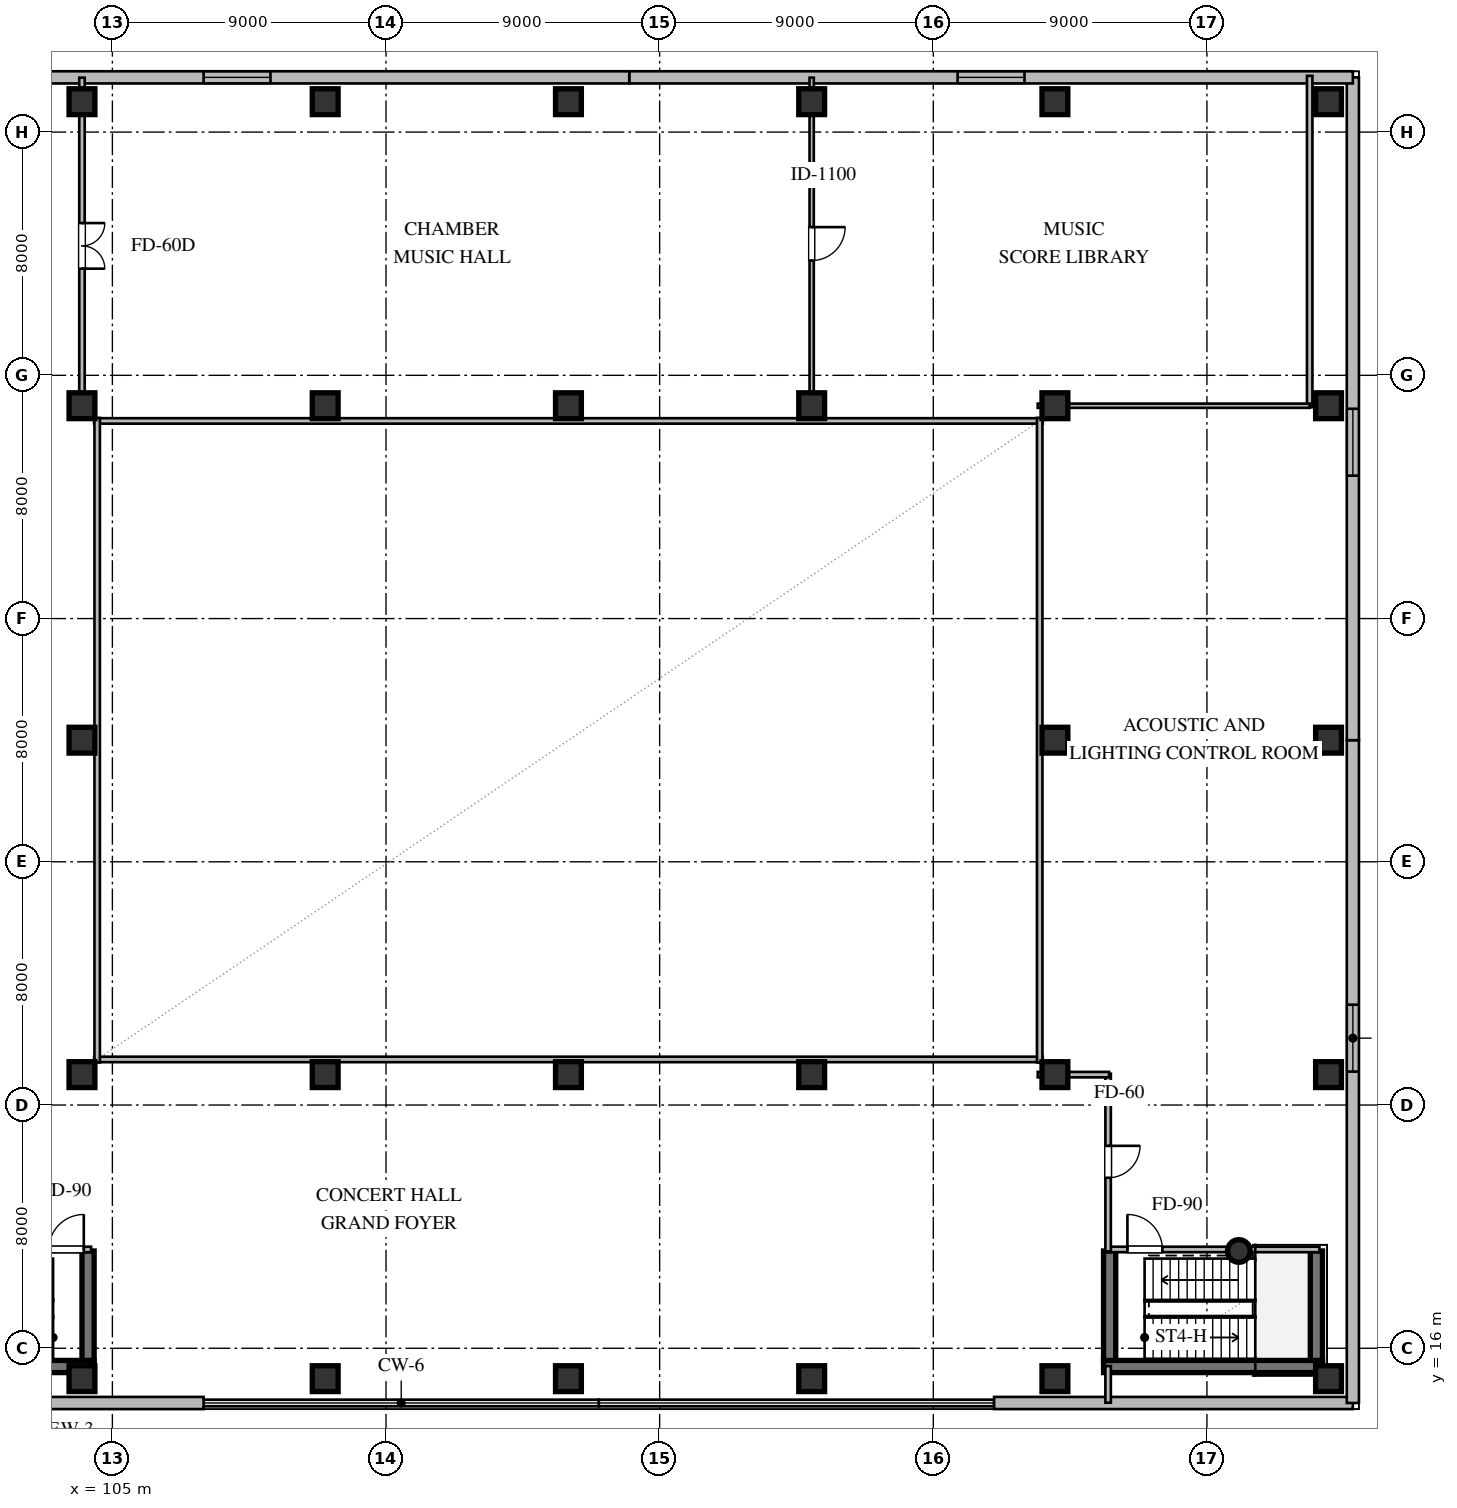
"""IFC4 building model, lengths in metres.
Left out: names, types, materials, properties, quantities, classifications, styles, units other than length and angle.
Written with IfcOpenShell. Run it as: python <this file> out.ifc"""

import sys

from ifc_helpers import new_model, si_unit, direction, frame, frame_2d, origin, origin_2d, place, context, subcontext, project, spatial, rectangle, circle, extrude, element, fill, save


model = new_model("IFC4")
c1 = context("Model", 3, precision=1e-05, world=origin(), true_north=direction((0.0, 1.0)))
c2 = subcontext(c1, "Body", "Model", "MODEL_VIEW")
j1 = project(units=[si_unit("LENGTHUNIT", "METRE"), si_unit("PLANEANGLEUNIT", "RADIAN")], contexts=[c1])
p1 = place(None, origin())
s1 = spatial("IfcSite", under=j1, at=p1, CompositionType="ELEMENT")
p2 = place(p1, origin())
s2 = spatial("IfcBuilding", under=s1, at=p2, CompositionType="ELEMENT")
p3 = place(p2, frame((0.0, 0.0, 9.6)))
s3 = spatial("IfcBuildingStorey", under=s2, at=p3, CompositionType="ELEMENT", Elevation=9.6)
for number, where, z_axis, x_axis in (
    (1, (104.0, 15.0, 0.0), (0.0, 0.0, 1.0), (1.0, 0.0, 0.0)),
    (2, (104.0, 25.0, 0.0), (0.0, 0.0, 1.0), (1.0, 0.0, 0.0)),
    (3, (104.0, 36.0, 0.0), (0.0, 0.0, 1.0), (1.0, 0.0, 0.0)),
    (4, (104.0, 47.0, 0.0), (0.0, 0.0, 1.0), (1.0, 0.0, 0.0)),
    (5, (104.0, 57.0, 0.0), (0.0, 0.0, 1.0), (1.0, 0.0, 0.0)),
    (6, (112.0, 15.0, 0.0), (0.0, 0.0, 1.0), (1.0, 0.0, 0.0)),
    (7, (112.0, 25.0, 0.0), (0.0, 0.0, 1.0), (1.0, 0.0, 0.0)),
    (8, (112.0, 47.0, 0.0), (0.0, 0.0, 1.0), (1.0, 0.0, 0.0)),
    (9, (112.0, 57.0, 0.0), (0.0, 0.0, 1.0), (1.0, 0.0, 0.0)),
    (10, (120.0, 15.0, 0.0), (0.0, 0.0, 1.0), (1.0, 0.0, 0.0)),
    (11, (120.0, 25.0, 0.0), (0.0, 0.0, 1.0), (1.0, 0.0, 0.0)),
    (12, (120.0, 47.0, 0.0), (0.0, 0.0, 1.0), (1.0, 0.0, 0.0)),
    (13, (120.0, 57.0, 0.0), (0.0, 0.0, 1.0), (1.0, 0.0, 0.0)),
    (14, (128.0, 15.0, 0.0), (0.0, 0.0, 1.0), (1.0, 0.0, 0.0)),
    (15, (128.0, 25.0, 0.0), (0.0, 0.0, 1.0), (1.0, 0.0, 0.0)),
    (16, (128.0, 47.0, 0.0), (0.0, 0.0, 1.0), (1.0, 0.0, 0.0)),
    (17, (128.0, 57.0, 0.0), (0.0, 0.0, 1.0), (1.0, 0.0, 0.0)),
    (18, (136.0, 15.0, 0.0), (0.0, 0.0, 1.0), (1.0, 0.0, 0.0)),
    (19, (136.0, 25.0, 0.0), (0.0, 0.0, 1.0), (1.0, 0.0, 0.0)),
    (20, (136.0, 36.0, 0.0), (0.0, 0.0, 1.0), (1.0, 0.0, 0.0)),
    (21, (136.0, 47.0, 0.0), (0.0, 0.0, 1.0), (1.0, 0.0, 0.0)),
    (22, (136.0, 57.0, 0.0), (0.0, 0.0, 1.0), (1.0, 0.0, 0.0)),
    (23, (145.0, 15.0, 0.0), (0.0, 0.0, 1.0), (1.0, 0.0, 0.0)),
    (24, (145.0, 25.0, 0.0), (0.0, 0.0, 1.0), (1.0, 0.0, 0.0)),
    (25, (145.0, 36.0, 0.0), (0.0, 0.0, 1.0), (1.0, 0.0, 0.0)),
    (26, (145.0, 47.0, 0.0), (0.0, 0.0, 1.0), (1.0, 0.0, 0.0)),
    (27, (145.0, 57.0, 0.0), (0.0, 0.0, 1.0), (1.0, 0.0, 0.0)),
):
    element("IfcColumn", number, at=place(p3, frame(where, z_axis=z_axis, x_axis=x_axis)), inside=s3, PredefinedType="COLUMN", context=c2, shape_type="SweptSolid", body=[
        extrude(rectangle(XDim=0.85, YDim=0.85, at=origin_2d()), origin(), (0.0, 0.0, 1.0), 4.8),
    ])
p4 = place(p3, frame((97.2, 15.4, 0.0), z_axis=(0.0, 0.0, 1.0), x_axis=(1.0, 0.0, 0.0)))
e28 = element("IfcWall", 28, at=p4, inside=s3, PredefinedType="SHEAR", context=c2, shape_type="SweptSolid", body=[
    extrude(rectangle(XDim=7.2, YDim=0.4, at=frame_2d((3.6, 0.0))), origin(), (0.0, 0.0, 1.0), 4.52),
])
p5 = place(p3, frame((104.2, 15.6, 0.0), z_axis=(0.0, 0.0, 1.0), x_axis=(0.0, 1.0, 0.0)))
e29 = element("IfcWall", 29, at=p5, inside=s3, PredefinedType="SHEAR", context=c2, shape_type="SweptSolid", body=[
    extrude(rectangle(XDim=3.6, YDim=0.4, at=frame_2d((1.8, 0.0))), origin(), (0.0, 0.0, 1.0), 4.52),
])
p6 = place(p3, frame((137.6, 15.4, 0.0), z_axis=(0.0, 0.0, 1.0), x_axis=(1.0, 0.0, 0.0)))
e30 = element("IfcWall", 30, at=p6, inside=s3, PredefinedType="SHEAR", context=c2, shape_type="SweptSolid", body=[
    extrude(rectangle(XDim=7.2, YDim=0.4, at=frame_2d((3.6, 0.0))), origin(), (0.0, 0.0, 1.0), 4.52),
])
for number, where, z_axis, x_axis in (
    (31, (137.8, 15.6, 0.0), (0.0, 0.0, 1.0), (0.0, 1.0, 0.0)),
    (32, (144.6, 15.6, 0.0), (0.0, 0.0, 1.0), (0.0, 1.0, 0.0)),
):
    element("IfcWall", number, at=place(p3, frame(where, z_axis=z_axis, x_axis=x_axis)), inside=s3, PredefinedType="SHEAR", context=c2, shape_type="SweptSolid", body=[
        extrude(rectangle(XDim=3.6, YDim=0.4, at=frame_2d((1.8, 0.0))), origin(), (0.0, 0.0, 1.0), 4.52),
    ])
p7 = place(p3, frame((142.05, 19.2, 0.0), z_axis=(0.0, 0.0, 1.0), x_axis=(1.0, 0.0, 0.0)))
e33 = element("IfcColumn", 33, at=p7, inside=s3, PredefinedType="COLUMN", context=c2, shape_type="SweptSolid", body=[
    extrude(circle(Radius=0.375, at=origin_2d()), origin(), (0.0, 0.0, 1.0), 4.8),
])
for number, where, z_axis, x_axis in (
    (34, (96.2, 14.2, 0.0), (0.0, 0.0, 1.0), (1.0, 0.0, 0.0)),
    (35, (134.0, 14.2, 0.0), (0.0, 0.0, 1.0), (1.0, 0.0, 0.0)),
):
    element("IfcWall", number, at=place(p3, frame(where, z_axis=z_axis, x_axis=x_axis)), inside=s3, PredefinedType="STANDARD", context=c2, shape_type="SweptSolid", body=[
        extrude(rectangle(XDim=11.8, YDim=0.4, at=frame_2d((5.9, 0.0))), origin(), (0.0, 0.0, 1.0), 4.52),
    ])
p8 = place(p3, frame((145.8, 14.2, 0.0), z_axis=(0.0, 0.0, 1.0), x_axis=(0.0, 1.0, 0.0)))
e36 = element("IfcWall", 36, at=p8, inside=s3, PredefinedType="STANDARD", context=c2, shape_type="SweptSolid", body=[
    extrude(rectangle(XDim=21.8, YDim=0.4, at=frame_2d((10.9, 0.0))), origin(), (0.0, 0.0, 1.0), 4.52),
])
p9 = place(p8, frame((10.9, 0.0, 1.25)))
e37 = element("IfcOpeningElement", 37, at=p9, cuts=e36, PredefinedType="OPENING", context=c2, shape_type="SweptSolid", body=[
    extrude(rectangle(XDim=2.2, YDim=1.5, at=frame_2d((1.1, 0.75))), frame((0.0, 0.21, 0.0), z_axis=(0.0, -1.0, 0.0), x_axis=(1.0, 0.0, 0.0)), (0.0, 0.0, 1.0), 0.42),
])
p10 = place(p3, frame((145.8, 36.0, 0.0), z_axis=(0.0, 0.0, 1.0), x_axis=(0.0, 1.0, 0.0)))
e38 = element("IfcWall", 38, at=p10, inside=s3, PredefinedType="STANDARD", context=c2, shape_type="SweptSolid", body=[
    extrude(rectangle(XDim=21.8, YDim=0.4, at=frame_2d((10.9, 0.0))), origin(), (0.0, 0.0, 1.0), 4.52),
])
p11 = place(p10, frame((8.7, 0.0, 1.25)))
e39 = element("IfcOpeningElement", 39, at=p11, cuts=e38, PredefinedType="OPENING", context=c2, shape_type="SweptSolid", body=[
    extrude(rectangle(XDim=2.2, YDim=1.5, at=frame_2d((1.1, 0.75))), frame((0.0, 0.21, 0.0), z_axis=(0.0, -1.0, 0.0), x_axis=(1.0, 0.0, 0.0)), (0.0, 0.0, 1.0), 0.42),
])
p12 = place(p3, frame((145.8, 57.8, 0.0), z_axis=(0.0, 0.0, 1.0), x_axis=(-1.0, 0.0, 0.0)))
e40 = element("IfcWall", 40, at=p12, inside=s3, PredefinedType="STANDARD", context=c2, shape_type="SweptSolid", body=[
    extrude(rectangle(XDim=23.8, YDim=0.4, at=frame_2d((11.9, 0.0))), origin(), (0.0, 0.0, 1.0), 4.52),
])
p13 = place(p12, frame((10.8, 0.0, 1.25)))
e41 = element("IfcOpeningElement", 41, at=p13, cuts=e40, PredefinedType="OPENING", context=c2, shape_type="SweptSolid", body=[
    extrude(rectangle(XDim=2.2, YDim=1.5, at=frame_2d((1.1, 0.75))), frame((0.0, 0.21, 0.0), z_axis=(0.0, -1.0, 0.0), x_axis=(1.0, 0.0, 0.0)), (0.0, 0.0, 1.0), 0.42),
])
p14 = place(p3, frame((122.0, 57.8, 0.0), z_axis=(0.0, 0.0, 1.0), x_axis=(-1.0, 0.0, 0.0)))
e42 = element("IfcWall", 42, at=p14, inside=s3, PredefinedType="STANDARD", context=c2, shape_type="SweptSolid", body=[
    extrude(rectangle(XDim=25.8, YDim=0.4, at=frame_2d((12.9, 0.0))), origin(), (0.0, 0.0, 1.0), 4.52),
])
p15 = place(p14, frame((11.8, 0.0, 1.25)))
e43 = element("IfcOpeningElement", 43, at=p15, cuts=e42, PredefinedType="OPENING", context=c2, shape_type="SweptSolid", body=[
    extrude(rectangle(XDim=2.2, YDim=1.5, at=frame_2d((1.1, 0.75))), frame((0.0, 0.21, 0.0), z_axis=(0.0, -1.0, 0.0), x_axis=(1.0, 0.0, 0.0)), (0.0, 0.0, 1.0), 0.42),
])
p16 = place(p3, frame((97.3, 19.25, 0.0), z_axis=(0.0, 0.0, 1.0), x_axis=(1.0, 0.0, 0.0)))
e44 = element("IfcWall", 44, at=p16, inside=s3, PredefinedType="PARTITIONING", context=c2, shape_type="SweptSolid", body=[
    extrude(rectangle(XDim=7.0, YDim=0.18, at=frame_2d((3.5, 0.0))), origin(), (0.0, 0.0, 1.0), 4.52),
])
p17 = place(p16, frame((5.61, 0.0, 0.0)))
e45 = element("IfcOpeningElement", 45, at=p17, cuts=e44, PredefinedType="OPENING", context=c2, shape_type="SweptSolid", body=[
    extrude(rectangle(XDim=1.15, YDim=2.1, at=frame_2d((0.575, 1.05))), frame((0.0, 0.1, 0.0), z_axis=(0.0, -1.0, 0.0), x_axis=(1.0, 0.0, 0.0)), (0.0, 0.0, 1.0), 0.2),
])
p18 = place(p3, frame((137.7, 19.25, 0.0), z_axis=(0.0, 0.0, 1.0), x_axis=(1.0, 0.0, 0.0)))
e46 = element("IfcWall", 46, at=p18, inside=s3, PredefinedType="PARTITIONING", context=c2, shape_type="SweptSolid", body=[
    extrude(rectangle(XDim=7.0, YDim=0.18, at=frame_2d((3.5, 0.0))), origin(), (0.0, 0.0, 1.0), 4.52),
])
p19 = place(p18, frame((0.685, 0.0, 0.0)))
e47 = element("IfcOpeningElement", 47, at=p19, cuts=e46, PredefinedType="OPENING", context=c2, shape_type="SweptSolid", body=[
    extrude(rectangle(XDim=1.15, YDim=2.1, at=frame_2d((0.575, 1.05))), frame((0.0, 0.1, 0.0), z_axis=(0.0, -1.0, 0.0), x_axis=(1.0, 0.0, 0.0)), (0.0, 0.0, 1.0), 0.2),
])
for number, where, z_axis, x_axis in (
    (48, (104.4, 25.5, 0.0), (0.0, 0.0, 1.0), (1.0, 0.0, 0.0)),
    (49, (104.4, 46.5, 0.0), (0.0, 0.0, 1.0), (1.0, 0.0, 0.0)),
):
    element("IfcWall", number, at=place(p3, frame(where, z_axis=z_axis, x_axis=x_axis)), inside=s3, PredefinedType="PARTITIONING", context=c2, shape_type="SweptSolid", body=[
        extrude(rectangle(XDim=31.2, YDim=0.18, at=frame_2d((15.6, 0.0))), origin(), (0.0, 0.0, 1.0), 3.899),
    ])
for number, where, z_axis, x_axis in (
    (50, (104.5, 25.4, 0.0), (0.0, 0.0, 1.0), (0.0, 1.0, 0.0)),
    (51, (135.5, 25.4, 0.0), (0.0, 0.0, 1.0), (0.0, 1.0, 0.0)),
):
    element("IfcWall", number, at=place(p3, frame(where, z_axis=z_axis, x_axis=x_axis)), inside=s3, PredefinedType="PARTITIONING", context=c2, shape_type="SweptSolid", body=[
        extrude(rectangle(XDim=21.2, YDim=0.18, at=frame_2d((10.6, 0.0))), origin(), (0.0, 0.0, 1.0), 4.093),
    ])
p20 = place(p3, frame((144.38, 46.95, 0.0), z_axis=(0.0, 0.0, 1.0), x_axis=(0.0, 1.0, 0.0)))
e52 = element("IfcWall", 52, at=p20, inside=s3, PredefinedType="PARTITIONING", context=c2, shape_type="SweptSolid", body=[
    extrude(rectangle(XDim=10.9, YDim=0.18, at=frame_2d((5.45, 0.0))), origin(), (0.0, 0.0, 1.0), 4.093),
])
p21 = place(p3, frame((104.0, 57.79, 0.0), z_axis=(0.0, 0.0, 1.0), x_axis=(0.0, -1.0, 0.0)))
e53 = element("IfcWall", 53, at=p21, inside=s3, PredefinedType="PARTITIONING", context=c2, shape_type="SweptSolid", body=[
    extrude(rectangle(XDim=10.855, YDim=0.18, at=frame_2d((5.427, 0.0))), origin(), (0.0, 0.0, 1.0), 4.093),
])
p22 = place(p21, frame((4.782, 0.0, 0.0)))
e54 = element("IfcOpeningElement", 54, at=p22, cuts=e53, PredefinedType="OPENING", context=c2, shape_type="SweptSolid", body=[
    extrude(rectangle(XDim=1.5, YDim=2.15, at=frame_2d((0.75, 1.075))), frame((0.0, 0.1, 0.0), z_axis=(0.0, -1.0, 0.0), x_axis=(1.0, 0.0, 0.0)), (0.0, 0.0, 1.0), 0.2),
])
p23 = place(p3, frame((137.75, 25.03, 0.0), z_axis=(0.0, 0.0, 1.0), x_axis=(0.0, -1.0, 0.0)))
e55 = element("IfcWall", 55, at=p23, inside=s3, PredefinedType="PARTITIONING", context=c2, shape_type="SweptSolid", body=[
    extrude(rectangle(XDim=5.845, YDim=0.18, at=frame_2d((2.922, 0.0))), origin(), (0.0, 0.0, 1.0), 4.52),
])
p24 = place(p23, frame((2.372, 0.0, 0.0)))
e56 = element("IfcOpeningElement", 56, at=p24, cuts=e55, PredefinedType="OPENING", context=c2, shape_type="SweptSolid", body=[
    extrude(rectangle(XDim=1.05, YDim=2.1, at=frame_2d((0.525, 1.05))), frame((0.0, 0.1, 0.0), z_axis=(0.0, -1.0, 0.0), x_axis=(1.0, 0.0, 0.0)), (0.0, 0.0, 1.0), 0.2),
])
p25 = place(p3, frame((135.435, 25.0, 0.0), z_axis=(0.0, 0.0, 1.0), x_axis=(1.0, 0.0, 0.0)))
e57 = element("IfcWall", 57, at=p25, inside=s3, PredefinedType="PARTITIONING", context=c2, shape_type="SweptSolid", body=[
    extrude(rectangle(XDim=2.345, YDim=0.18, at=frame_2d((1.172, 0.0))), origin(), (0.0, 0.0, 1.0), 3.899),
])
p26 = place(p3, frame((137.75, 15.415, 0.0), z_axis=(0.0, 0.0, 1.0), x_axis=(0.0, -1.0, 0.0)))
e58 = element("IfcWall", 58, at=p26, inside=s3, PredefinedType="PARTITIONING", context=c2, shape_type="SweptSolid", body=[
    extrude(rectangle(XDim=1.205, YDim=0.18, at=frame_2d((0.603, 0.0))), origin(), (0.0, 0.0, 1.0), 4.52),
])
p27 = place(p3, frame((128.0, 57.79, 0.0), z_axis=(0.0, 0.0, 1.0), x_axis=(0.0, -1.0, 0.0)))
e59 = element("IfcWall", 59, at=p27, inside=s3, PredefinedType="PARTITIONING", context=c2, shape_type="SweptSolid", body=[
    extrude(rectangle(XDim=10.82, YDim=0.14, at=frame_2d((5.41, 0.0))), origin(), (0.0, 0.0, 1.0), 4.093),
])
p28 = place(p27, frame((4.915, 0.0, 0.0)))
e60 = element("IfcOpeningElement", 60, at=p28, cuts=e59, PredefinedType="OPENING", context=c2, shape_type="SweptSolid", body=[
    extrude(rectangle(XDim=1.1, YDim=2.1, at=frame_2d((0.55, 1.05))), frame((0.0, 0.08, 0.0), z_axis=(0.0, -1.0, 0.0), x_axis=(1.0, 0.0, 0.0)), (0.0, 0.0, 1.0), 0.16),
])
p29 = place(p3, frame((144.38, 47.0, 0.0), z_axis=(0.0, 0.0, 1.0), x_axis=(-1.0, 0.0, 0.0)))
e61 = element("IfcWall", 61, at=p29, inside=s3, PredefinedType="PARTITIONING", context=c2, shape_type="SweptSolid", body=[
    extrude(rectangle(XDim=8.945, YDim=0.14, at=frame_2d((4.472, 0.0))), origin(), (0.0, 0.0, 1.0), 3.899),
])
p30 = place(p9, origin())
e62 = element("IfcWindow", 62, at=p30, inside=s3, PartitioningType="SINGLE_PANEL", PredefinedType="WINDOW", context=c2, shape_type="SweptSolid", body=[
    extrude(rectangle(XDim=2.2, YDim=1.5, at=frame_2d((1.1, 0.75))), frame((0.0, 0.03, 0.0), z_axis=(0.0, -1.0, 0.0), x_axis=(1.0, 0.0, 0.0)), (0.0, 0.0, 1.0), 0.06),
])
fill(e37, e62)
p31 = place(p11, origin())
e63 = element("IfcWindow", 63, at=p31, inside=s3, PartitioningType="SINGLE_PANEL", PredefinedType="WINDOW", context=c2, shape_type="SweptSolid", body=[
    extrude(rectangle(XDim=2.2, YDim=1.5, at=frame_2d((1.1, 0.75))), frame((0.0, 0.03, 0.0), z_axis=(0.0, -1.0, 0.0), x_axis=(1.0, 0.0, 0.0)), (0.0, 0.0, 1.0), 0.06),
])
fill(e39, e63)
p32 = place(p13, origin())
e64 = element("IfcWindow", 64, at=p32, inside=s3, PartitioningType="SINGLE_PANEL", PredefinedType="WINDOW", context=c2, shape_type="SweptSolid", body=[
    extrude(rectangle(XDim=2.2, YDim=1.5, at=frame_2d((1.1, 0.75))), frame((0.0, 0.03, 0.0), z_axis=(0.0, -1.0, 0.0), x_axis=(1.0, 0.0, 0.0)), (0.0, 0.0, 1.0), 0.06),
])
fill(e41, e64)
p33 = place(p15, origin())
e65 = element("IfcWindow", 65, at=p33, inside=s3, PartitioningType="SINGLE_PANEL", PredefinedType="WINDOW", context=c2, shape_type="SweptSolid", body=[
    extrude(rectangle(XDim=2.2, YDim=1.5, at=frame_2d((1.1, 0.75))), frame((0.0, 0.03, 0.0), z_axis=(0.0, -1.0, 0.0), x_axis=(1.0, 0.0, 0.0)), (0.0, 0.0, 1.0), 0.06),
])
fill(e43, e65)
p34 = place(p17, origin())
e66 = element("IfcDoor", 66, at=p34, inside=s3, OperationType="SINGLE_SWING_RIGHT", PredefinedType="DOOR", context=c2, shape_type="SweptSolid", body=[
    extrude(rectangle(XDim=1.15, YDim=2.1, at=frame_2d((0.575, 1.05))), frame((0.0, 0.025, 0.0), z_axis=(0.0, -1.0, 0.0), x_axis=(1.0, 0.0, 0.0)), (0.0, 0.0, 1.0), 0.05),
])
fill(e45, e66)
p35 = place(p19, origin())
e67 = element("IfcDoor", 67, at=p35, inside=s3, OperationType="SINGLE_SWING_LEFT", PredefinedType="DOOR", context=c2, shape_type="SweptSolid", body=[
    extrude(rectangle(XDim=1.15, YDim=2.1, at=frame_2d((0.575, 1.05))), frame((0.0, 0.025, 0.0), z_axis=(0.0, -1.0, 0.0), x_axis=(1.0, 0.0, 0.0)), (0.0, 0.0, 1.0), 0.05),
])
fill(e47, e67)
p36 = place(p22, origin())
e68 = element("IfcDoor", 68, at=p36, inside=s3, OperationType="DOUBLE_DOOR_SINGLE_SWING", PredefinedType="DOOR", context=c2, shape_type="SweptSolid", body=[
    extrude(rectangle(XDim=1.5, YDim=2.15, at=frame_2d((0.75, 1.075))), frame((0.0, 0.025, 0.0), z_axis=(0.0, -1.0, 0.0), x_axis=(1.0, 0.0, 0.0)), (0.0, 0.0, 1.0), 0.05),
])
fill(e54, e68)
p37 = place(p24, origin())
e69 = element("IfcDoor", 69, at=p37, inside=s3, OperationType="SINGLE_SWING_LEFT", PredefinedType="DOOR", context=c2, shape_type="SweptSolid", body=[
    extrude(rectangle(XDim=1.05, YDim=2.1, at=frame_2d((0.525, 1.05))), frame((0.0, 0.025, 0.0), z_axis=(0.0, -1.0, 0.0), x_axis=(1.0, 0.0, 0.0)), (0.0, 0.0, 1.0), 0.05),
])
fill(e56, e69)
p38 = place(p28, origin())
e70 = element("IfcDoor", 70, at=p38, inside=s3, OperationType="SINGLE_SWING_LEFT", PredefinedType="DOOR", context=c2, shape_type="SweptSolid", body=[
    extrude(rectangle(XDim=1.1, YDim=2.1, at=frame_2d((0.55, 1.05))), frame((0.0, 0.025, 0.0), z_axis=(0.0, -1.0, 0.0), x_axis=(1.0, 0.0, 0.0)), (0.0, 0.0, 1.0), 0.05),
])
fill(e60, e70)
save(model, sys.argv[1])
